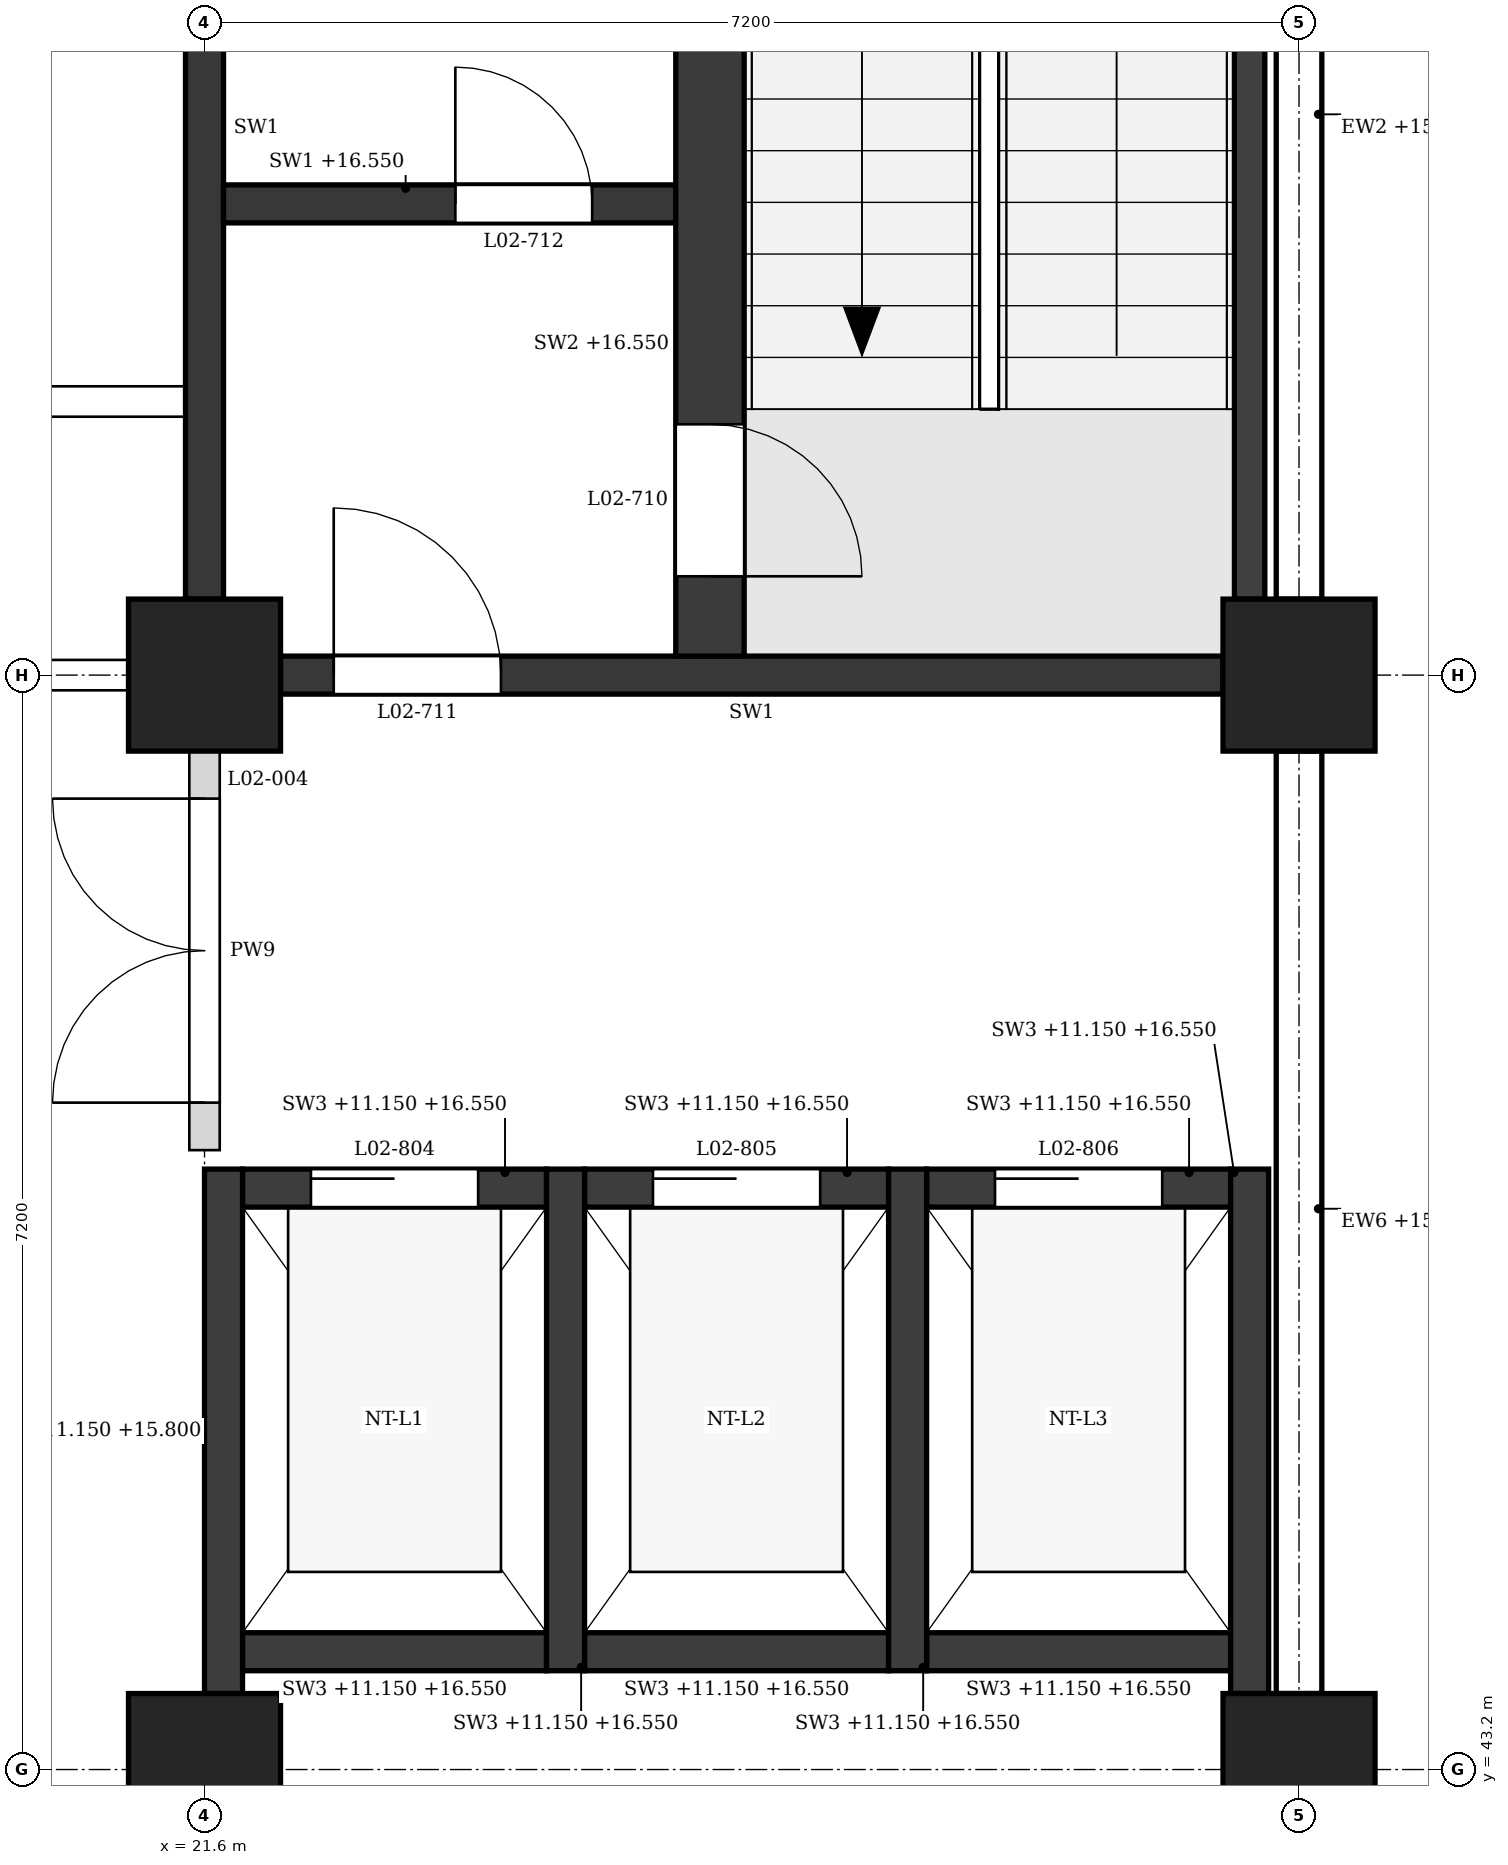
"""IFC4 building model, lengths in metres.
Left out: names, types, materials, properties, quantities, classifications, styles, units other than length and angle.
Written with IfcOpenShell. Run it as: python <this file> out.ifc"""

import sys

from ifc_helpers import new_model, si_unit, direction, frame, frame_2d, origin, origin_2d, place, context, subcontext, project, spatial, polyline, rectangle, outline, extrude, element, fill, save


model = new_model("IFC4")
c1 = context("Model", 3, precision=1e-05, world=origin(), true_north=direction((0.0, 1.0)))
c2 = subcontext(c1, "Body", "Model", "MODEL_VIEW")
j1 = project(units=[si_unit("LENGTHUNIT", "METRE"), si_unit("PLANEANGLEUNIT", "RADIAN")], contexts=[c1])
p1 = place(None, origin())
s1 = spatial("IfcSite", under=j1, at=p1, CompositionType="ELEMENT")
p2 = place(p1, origin())
s2 = spatial("IfcBuilding", under=s1, at=p2, CompositionType="ELEMENT")
p3 = place(p2, frame((0.0, 0.0, 11.4)))
s3 = spatial("IfcBuildingStorey", under=s2, at=p3, CompositionType="ELEMENT", Elevation=11.4)
for number, where, z_axis, x_axis in (
    (1, (21.6, 43.2, 0.0), (0.0, 0.0, 1.0), (1.0, 0.0, 0.0)),
    (2, (21.6, 50.4, 0.0), (0.0, 0.0, 1.0), (1.0, 0.0, 0.0)),
    (3, (28.8, 43.2, 0.0), (0.0, 0.0, 1.0), (1.0, 0.0, 0.0)),
    (4, (28.8, 50.4, 0.0), (0.0, 0.0, 1.0), (1.0, 0.0, 0.0)),
):
    element("IfcColumn", number, at=place(p3, frame(where, z_axis=z_axis, x_axis=x_axis)), inside=s3, PredefinedType="COLUMN", context=c2, shape_type="SweptSolid", body=[
        extrude(rectangle(XDim=1.0, YDim=1.0, at=origin_2d()), origin(), (0.0, 0.0, 1.0), 5.4),
    ])
p4 = place(p3, frame((28.8, 43.7, 0.0), z_axis=(0.0, 0.0, 1.0), x_axis=(0.0, 1.0, 0.0)))
e5 = element("IfcWall", 5, at=p4, inside=s3, PredefinedType="STANDARD", context=c2, shape_type="SweptSolid", body=[
    extrude(rectangle(XDim=6.2, YDim=0.3, at=frame_2d((3.1, 0.0))), origin(), (0.0, 0.0, 1.0), 4.55),
])
p5 = place(p3, frame((28.8, 50.9, 0.0), z_axis=(0.0, 0.0, 1.0), x_axis=(0.0, 1.0, 0.0)))
e6 = element("IfcWall", 6, at=p5, inside=s3, PredefinedType="STANDARD", context=c2, shape_type="SweptSolid", body=[
    extrude(rectangle(XDim=6.2, YDim=0.3, at=frame_2d((3.1, 0.0))), origin(), (0.0, 0.0, 1.0), 4.55),
])
p6 = place(p3, frame((22.1, 50.4, 0.0), z_axis=(0.0, 0.0, 1.0), x_axis=(1.0, 0.0, 0.0)))
e7 = element("IfcWall", 7, at=p6, inside=s3, PredefinedType="SHEAR", context=c2, shape_type="SweptSolid", body=[
    extrude(rectangle(XDim=6.2, YDim=0.25, at=frame_2d((3.1, 0.0))), origin(), (0.0, 0.0, 1.0), 4.4),
])
p7 = place(p6, frame((0.35, 0.0, 0.0)))
e8 = element("IfcOpeningElement", 8, at=p7, cuts=e7, PredefinedType="OPENING", context=c2, shape_type="SweptSolid", body=[
    extrude(rectangle(XDim=1.1, YDim=2.1, at=frame_2d((0.55, 1.05))), frame((0.0, 0.135, 0.0), z_axis=(0.0, -1.0, 0.0), x_axis=(1.0, 0.0, 0.0)), (0.0, 0.0, 1.0), 0.27),
])
p8 = place(p3, frame((21.6, 50.9, 0.0), z_axis=(0.0, 0.0, 1.0), x_axis=(0.0, 1.0, 0.0)))
e9 = element("IfcWall", 9, at=p8, inside=s3, PredefinedType="SHEAR", context=c2, shape_type="SweptSolid", body=[
    extrude(rectangle(XDim=6.2, YDim=0.25, at=frame_2d((3.1, 0.0))), origin(), (0.0, 0.0, 1.0), 4.4),
])
p9 = place(p3, frame((28.475, 50.9, -0.25), z_axis=(0.0, 0.0, 1.0), x_axis=(0.0, 1.0, 0.0)))
e10 = element("IfcWall", 10, at=p9, inside=s3, PredefinedType="SHEAR", context=c2, shape_type="SweptSolid", body=[
    extrude(rectangle(XDim=6.2, YDim=0.2, at=frame_2d((3.1, 0.0))), origin(), (0.0, 0.0, 1.0), 5.4),
])
p10 = place(p3, frame((24.925, 50.525, 0.0), z_axis=(0.0, 0.0, 1.0), x_axis=(0.0, 1.0, 0.0)))
e11 = element("IfcWall", 11, at=p10, inside=s3, PredefinedType="SHEAR", context=c2, shape_type="SweptSolid", body=[
    extrude(rectangle(XDim=6.85, YDim=0.45, at=frame_2d((3.425, 0.0))), origin(), (0.0, 0.0, 1.0), 5.15),
])
p11 = place(p10, frame((0.525, 0.0, 0.0)))
e12 = element("IfcOpeningElement", 12, at=p11, cuts=e11, PredefinedType="OPENING", context=c2, shape_type="SweptSolid", body=[
    extrude(rectangle(XDim=1.0, YDim=2.1, at=frame_2d((0.5, 1.05))), frame((0.0, 0.235, 0.0), z_axis=(0.0, -1.0, 0.0), x_axis=(1.0, 0.0, 0.0)), (0.0, 0.0, 1.0), 0.47),
])
p12 = place(p3, frame((21.725, 53.5, 0.0), z_axis=(0.0, 0.0, 1.0), x_axis=(1.0, 0.0, 0.0)))
e13 = element("IfcWall", 13, at=p12, inside=s3, PredefinedType="SHEAR", context=c2, shape_type="SweptSolid", body=[
    extrude(rectangle(XDim=2.975, YDim=0.25, at=frame_2d((1.487, 0.0))), origin(), (0.0, 0.0, 1.0), 5.15),
])
p13 = place(p12, frame((1.525, 0.0, 0.0)))
e14 = element("IfcOpeningElement", 14, at=p13, cuts=e13, PredefinedType="OPENING", context=c2, shape_type="SweptSolid", body=[
    extrude(rectangle(XDim=0.9, YDim=2.1, at=frame_2d((0.45, 1.05))), frame((0.0, 0.135, 0.0), z_axis=(0.0, -1.0, 0.0), x_axis=(1.0, 0.0, 0.0)), (0.0, 0.0, 1.0), 0.27),
])
p14 = place(p3, frame((21.725, 43.7, -0.25), z_axis=(0.0, 0.0, 1.0), x_axis=(0.0, 1.0, 0.0)))
e15 = element("IfcWall", 15, at=p14, inside=s3, PredefinedType="SHEAR", context=c2, shape_type="SweptSolid", body=[
    extrude(rectangle(XDim=3.45, YDim=0.25, at=frame_2d((1.725, 0.0))), origin(), (0.0, 0.0, 1.0), 4.65),
])
for number, where, z_axis, x_axis in (
    (16, (23.975, 43.85, -0.25), (0.0, 0.0, 1.0), (0.0, 1.0, 0.0)),
    (17, (26.225, 43.85, -0.25), (0.0, 0.0, 1.0), (0.0, 1.0, 0.0)),
):
    element("IfcWall", number, at=place(p3, frame(where, z_axis=z_axis, x_axis=x_axis)), inside=s3, PredefinedType="SHEAR", context=c2, shape_type="SweptSolid", body=[
        extrude(rectangle(XDim=3.3, YDim=0.25, at=frame_2d((1.65, 0.0))), origin(), (0.0, 0.0, 1.0), 5.4),
    ])
p15 = place(p3, frame((28.475, 43.7, -0.25), z_axis=(0.0, 0.0, 1.0), x_axis=(0.0, 1.0, 0.0)))
e18 = element("IfcWall", 18, at=p15, inside=s3, PredefinedType="SHEAR", context=c2, shape_type="SweptSolid", body=[
    extrude(rectangle(XDim=3.45, YDim=0.25, at=frame_2d((1.725, 0.0))), origin(), (0.0, 0.0, 1.0), 5.4),
])
p16 = place(p3, frame((21.85, 47.025, -0.25), z_axis=(0.0, 0.0, 1.0), x_axis=(1.0, 0.0, 0.0)))
e19 = element("IfcWall", 19, at=p16, inside=s3, PredefinedType="SHEAR", context=c2, shape_type="SweptSolid", body=[
    extrude(rectangle(XDim=2.0, YDim=0.25, at=frame_2d((1.0, 0.0))), origin(), (0.0, 0.0, 1.0), 5.4),
])
p17 = place(p16, frame((0.45, 0.0, 0.25)))
e20 = element("IfcOpeningElement", 20, at=p17, cuts=e19, PredefinedType="OPENING", context=c2, shape_type="SweptSolid", body=[
    extrude(rectangle(XDim=1.1, YDim=2.1, at=frame_2d((0.55, 1.05))), frame((0.0, 0.135, 0.0), z_axis=(0.0, -1.0, 0.0), x_axis=(1.0, 0.0, 0.0)), (0.0, 0.0, 1.0), 0.27),
])
p18 = place(p3, frame((21.85, 43.975, -0.25), z_axis=(0.0, 0.0, 1.0), x_axis=(1.0, 0.0, 0.0)))
e21 = element("IfcWall", 21, at=p18, inside=s3, PredefinedType="SHEAR", context=c2, shape_type="SweptSolid", body=[
    extrude(rectangle(XDim=2.0, YDim=0.25, at=frame_2d((1.0, 0.0))), origin(), (0.0, 0.0, 1.0), 5.4),
])
p19 = place(p3, frame((24.1, 47.025, -0.25), z_axis=(0.0, 0.0, 1.0), x_axis=(1.0, 0.0, 0.0)))
e22 = element("IfcWall", 22, at=p19, inside=s3, PredefinedType="SHEAR", context=c2, shape_type="SweptSolid", body=[
    extrude(rectangle(XDim=2.0, YDim=0.25, at=frame_2d((1.0, 0.0))), origin(), (0.0, 0.0, 1.0), 5.4),
])
p20 = place(p19, frame((0.45, 0.0, 0.25)))
e23 = element("IfcOpeningElement", 23, at=p20, cuts=e22, PredefinedType="OPENING", context=c2, shape_type="SweptSolid", body=[
    extrude(rectangle(XDim=1.1, YDim=2.1, at=frame_2d((0.55, 1.05))), frame((0.0, 0.135, 0.0), z_axis=(0.0, -1.0, 0.0), x_axis=(1.0, 0.0, 0.0)), (0.0, 0.0, 1.0), 0.27),
])
p21 = place(p3, frame((24.1, 43.975, -0.25), z_axis=(0.0, 0.0, 1.0), x_axis=(1.0, 0.0, 0.0)))
e24 = element("IfcWall", 24, at=p21, inside=s3, PredefinedType="SHEAR", context=c2, shape_type="SweptSolid", body=[
    extrude(rectangle(XDim=2.0, YDim=0.25, at=frame_2d((1.0, 0.0))), origin(), (0.0, 0.0, 1.0), 5.4),
])
p22 = place(p3, frame((26.35, 47.025, -0.25), z_axis=(0.0, 0.0, 1.0), x_axis=(1.0, 0.0, 0.0)))
e25 = element("IfcWall", 25, at=p22, inside=s3, PredefinedType="SHEAR", context=c2, shape_type="SweptSolid", body=[
    extrude(rectangle(XDim=2.0, YDim=0.25, at=frame_2d((1.0, 0.0))), origin(), (0.0, 0.0, 1.0), 5.4),
])
p23 = place(p22, frame((0.45, 0.0, 0.25)))
e26 = element("IfcOpeningElement", 26, at=p23, cuts=e25, PredefinedType="OPENING", context=c2, shape_type="SweptSolid", body=[
    extrude(rectangle(XDim=1.1, YDim=2.1, at=frame_2d((0.55, 1.05))), frame((0.0, 0.135, 0.0), z_axis=(0.0, -1.0, 0.0), x_axis=(1.0, 0.0, 0.0)), (0.0, 0.0, 1.0), 0.27),
])
p24 = place(p3, frame((26.35, 43.975, -0.25), z_axis=(0.0, 0.0, 1.0), x_axis=(1.0, 0.0, 0.0)))
e27 = element("IfcWall", 27, at=p24, inside=s3, PredefinedType="SHEAR", context=c2, shape_type="SweptSolid", body=[
    extrude(rectangle(XDim=2.0, YDim=0.25, at=frame_2d((1.0, 0.0))), origin(), (0.0, 0.0, 1.0), 5.4),
])
p25 = place(p3, frame((14.9, 50.4, 0.0), z_axis=(0.0, 0.0, 1.0), x_axis=(1.0, 0.0, 0.0)))
e28 = element("IfcWall", 28, at=p25, inside=s3, PredefinedType="PARTITIONING", context=c2, shape_type="SweptSolid", body=[
    extrude(rectangle(XDim=6.2, YDim=0.2, at=frame_2d((3.1, 0.0))), origin(), (0.0, 0.0, 1.0), 4.4),
])
p26 = place(p25, frame((4.15, 0.0, 0.0)))
e29 = element("IfcOpeningElement", 29, at=p26, cuts=e28, PredefinedType="OPENING", context=c2, shape_type="SweptSolid", body=[
    extrude(rectangle(XDim=1.0, YDim=2.1, at=frame_2d((0.5, 1.05))), frame((0.0, 0.11, 0.0), z_axis=(0.0, -1.0, 0.0), x_axis=(1.0, 0.0, 0.0)), (0.0, 0.0, 1.0), 0.22),
])
p27 = place(p3, frame((7.325, 52.2, 0.0), z_axis=(0.0, 0.0, 1.0), x_axis=(1.0, 0.0, 0.0)))
e30 = element("IfcWall", 30, at=p27, inside=s3, PredefinedType="PARTITIONING", context=c2, shape_type="SweptSolid", body=[
    extrude(outline(polyline([(0.0, 0.0), (14.15, 0.0), (14.15, 4.4), (14.025, 4.4), (14.025, 5.15), (7.325, 5.15), (7.325, 4.4), (6.825, 4.4), (6.825, 5.15), (0.125, 5.15), (0.125, 4.4), (0.0, 4.4), (0.0, 0.0)])), frame((0.0, 0.1, 0.0), z_axis=(0.0, -1.0, 0.0), x_axis=(1.0, 0.0, 0.0)), (0.0, 0.0, 1.0), 0.2),
])
p28 = place(p27, frame((1.238, 0.0, 0.0)))
e31 = element("IfcOpeningElement", 31, at=p28, cuts=e30, PredefinedType="OPENING", context=c2, shape_type="SweptSolid", body=[
    extrude(rectangle(XDim=1.0, YDim=2.1, at=frame_2d((0.5, 1.05))), frame((0.0, 0.11, 0.0), z_axis=(0.0, -1.0, 0.0), x_axis=(1.0, 0.0, 0.0)), (0.0, 0.0, 1.0), 0.22),
])
p29 = place(p27, frame((4.775, 0.0, 0.0)))
e32 = element("IfcOpeningElement", 32, at=p29, cuts=e30, PredefinedType="OPENING", context=c2, shape_type="SweptSolid", body=[
    extrude(rectangle(XDim=1.0, YDim=2.1, at=frame_2d((0.5, 1.05))), frame((0.0, 0.11, 0.0), z_axis=(0.0, -1.0, 0.0), x_axis=(1.0, 0.0, 0.0)), (0.0, 0.0, 1.0), 0.22),
])
p30 = place(p27, frame((8.375, 0.0, 0.0)))
e33 = element("IfcOpeningElement", 33, at=p30, cuts=e30, PredefinedType="OPENING", context=c2, shape_type="SweptSolid", body=[
    extrude(rectangle(XDim=1.0, YDim=2.1, at=frame_2d((0.5, 1.05))), frame((0.0, 0.11, 0.0), z_axis=(0.0, -1.0, 0.0), x_axis=(1.0, 0.0, 0.0)), (0.0, 0.0, 1.0), 0.22),
])
p31 = place(p27, frame((11.913, 0.0, 0.0)))
e34 = element("IfcOpeningElement", 34, at=p31, cuts=e30, PredefinedType="OPENING", context=c2, shape_type="SweptSolid", body=[
    extrude(rectangle(XDim=1.0, YDim=2.1, at=frame_2d((0.5, 1.05))), frame((0.0, 0.11, 0.0), z_axis=(0.0, -1.0, 0.0), x_axis=(1.0, 0.0, 0.0)), (0.0, 0.0, 1.0), 0.22),
])
p32 = place(p3, frame((21.6, 47.275, 0.0), z_axis=(0.0, 0.0, 1.0), x_axis=(0.0, 1.0, 0.0)))
e35 = element("IfcWall", 35, at=p32, inside=s3, PredefinedType="PARTITIONING", context=c2, shape_type="SweptSolid", body=[
    extrude(rectangle(XDim=2.625, YDim=0.2, at=frame_2d((1.312, 0.0))), origin(), (0.0, 0.0, 1.0), 4.4),
])
p33 = place(p32, frame((0.312, 0.0, 0.0)))
e36 = element("IfcOpeningElement", 36, at=p33, cuts=e35, PredefinedType="OPENING", context=c2, shape_type="SweptSolid", body=[
    extrude(rectangle(XDim=2.0, YDim=2.4, at=frame_2d((1.0, 1.2))), frame((0.0, 0.11, 0.0), z_axis=(0.0, -1.0, 0.0), x_axis=(1.0, 0.0, 0.0)), (0.0, 0.0, 1.0), 0.22),
])
p34 = place(p11, frame((1.0, 0.0, 0.0), z_axis=(0.0, 0.0, 1.0), x_axis=(-1.0, 0.0, 0.0)))
e37 = element("IfcDoor", 37, at=p34, inside=s3, OperationType="SINGLE_SWING_RIGHT", PredefinedType="DOOR", context=c2, shape_type="SweptSolid", body=[
    extrude(rectangle(XDim=1.0, YDim=2.1, at=frame_2d((0.5, 1.05))), frame((0.0, 0.025, 0.0), z_axis=(0.0, -1.0, 0.0), x_axis=(1.0, 0.0, 0.0)), (0.0, 0.0, 1.0), 0.05),
])
fill(e12, e37)
p35 = place(p7, origin())
e38 = element("IfcDoor", 38, at=p35, inside=s3, OperationType="SINGLE_SWING_LEFT", PredefinedType="DOOR", context=c2, shape_type="SweptSolid", body=[
    extrude(rectangle(XDim=1.1, YDim=2.1, at=frame_2d((0.55, 1.05))), frame((0.0, 0.025, 0.0), z_axis=(0.0, -1.0, 0.0), x_axis=(1.0, 0.0, 0.0)), (0.0, 0.0, 1.0), 0.05),
])
fill(e8, e38)
p36 = place(p13, origin())
e39 = element("IfcDoor", 39, at=p36, inside=s3, OperationType="SINGLE_SWING_LEFT", PredefinedType="DOOR", context=c2, shape_type="SweptSolid", body=[
    extrude(rectangle(XDim=0.9, YDim=2.1, at=frame_2d((0.45, 1.05))), frame((0.0, 0.025, 0.0), z_axis=(0.0, -1.0, 0.0), x_axis=(1.0, 0.0, 0.0)), (0.0, 0.0, 1.0), 0.05),
])
fill(e14, e39)
p37 = place(p17, origin())
e40 = element("IfcDoor", 40, at=p37, inside=s3, OperationType="SLIDING_TO_LEFT", PredefinedType="DOOR", context=c2, shape_type="SweptSolid", body=[
    extrude(rectangle(XDim=1.1, YDim=2.1, at=frame_2d((0.55, 1.05))), frame((0.0, 0.025, 0.0), z_axis=(0.0, -1.0, 0.0), x_axis=(1.0, 0.0, 0.0)), (0.0, 0.0, 1.0), 0.05),
])
fill(e20, e40)
p38 = place(p20, origin())
e41 = element("IfcDoor", 41, at=p38, inside=s3, OperationType="SLIDING_TO_LEFT", PredefinedType="DOOR", context=c2, shape_type="SweptSolid", body=[
    extrude(rectangle(XDim=1.1, YDim=2.1, at=frame_2d((0.55, 1.05))), frame((0.0, 0.025, 0.0), z_axis=(0.0, -1.0, 0.0), x_axis=(1.0, 0.0, 0.0)), (0.0, 0.0, 1.0), 0.05),
])
fill(e23, e41)
p39 = place(p23, origin())
e42 = element("IfcDoor", 42, at=p39, inside=s3, OperationType="SLIDING_TO_LEFT", PredefinedType="DOOR", context=c2, shape_type="SweptSolid", body=[
    extrude(rectangle(XDim=1.1, YDim=2.1, at=frame_2d((0.55, 1.05))), frame((0.0, 0.025, 0.0), z_axis=(0.0, -1.0, 0.0), x_axis=(1.0, 0.0, 0.0)), (0.0, 0.0, 1.0), 0.05),
])
fill(e26, e42)
p40 = place(p33, origin())
e43 = element("IfcDoor", 43, at=p40, inside=s3, OperationType="DOUBLE_DOOR_SINGLE_SWING", PredefinedType="DOOR", context=c2, shape_type="SweptSolid", body=[
    extrude(rectangle(XDim=2.0, YDim=2.4, at=frame_2d((1.0, 1.2))), frame((0.0, 0.025, 0.0), z_axis=(0.0, -1.0, 0.0), x_axis=(1.0, 0.0, 0.0)), (0.0, 0.0, 1.0), 0.05),
])
fill(e36, e43)
save(model, sys.argv[1])
